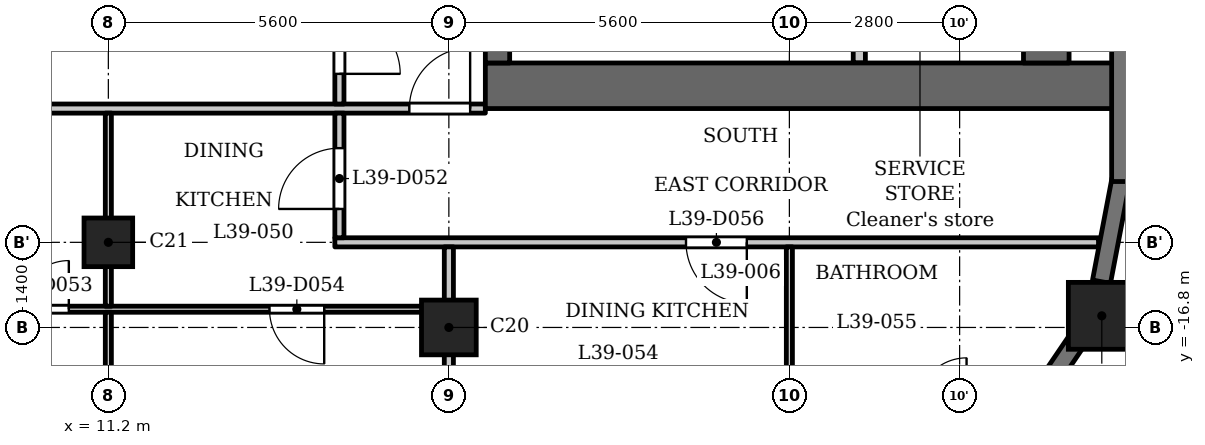
"""IFC4 building model, lengths in metres.
Left out: names, types, materials, properties, quantities, classifications, styles, units other than length and angle.
Written with IfcOpenShell. Run it as: python <this file> out.ifc"""

import sys

from ifc_helpers import new_model, si_unit, direction, frame, frame_2d, origin, origin_2d, place, context, subcontext, project, spatial, rectangle, extrude, element, fill, save


model = new_model("IFC4")
c1 = context("Model", 3, precision=1e-05, world=origin(), true_north=direction((0.0, 1.0)))
c2 = subcontext(c1, "Body", "Model", "MODEL_VIEW")
j1 = project(units=[si_unit("LENGTHUNIT", "METRE"), si_unit("PLANEANGLEUNIT", "RADIAN")], contexts=[c1])
p1 = place(None, origin())
s1 = spatial("IfcSite", under=j1, at=p1, CompositionType="ELEMENT")
p2 = place(p1, origin())
s2 = spatial("IfcBuilding", under=s1, at=p2, CompositionType="ELEMENT")
p3 = place(p2, frame((0.0, 0.0, 153.6)))
s3 = spatial("IfcBuildingStorey", under=s2, at=p3, CompositionType="ELEMENT", Elevation=153.6)
p4 = place(p3, frame((27.538, -16.609, 0.0), z_axis=(0.0, 0.0, 1.0), x_axis=(1.0, 0.0, 0.0)))
e1 = element("IfcColumn", 1, at=p4, inside=s3, PredefinedType="COLUMN", context=c2, shape_type="SweptSolid", body=[
    extrude(rectangle(XDim=1.1, YDim=1.1, at=origin_2d()), origin(), (0.0, 0.0, 1.0), 3.5),
])
p5 = place(p3, frame((16.8, -16.8, 0.0), z_axis=(0.0, 0.0, 1.0), x_axis=(1.0, 0.0, 0.0)))
e2 = element("IfcColumn", 2, at=p5, inside=s3, PredefinedType="COLUMN", context=c2, shape_type="SweptSolid", body=[
    extrude(rectangle(XDim=0.9, YDim=0.9, at=origin_2d()), origin(), (0.0, 0.0, 1.0), 3.5),
])
p6 = place(p3, frame((11.2, -15.4, 0.0), z_axis=(0.0, 0.0, 1.0), x_axis=(1.0, 0.0, 0.0)))
e3 = element("IfcColumn", 3, at=p6, inside=s3, PredefinedType="COLUMN", context=c2, shape_type="SweptSolid", body=[
    extrude(rectangle(XDim=0.8, YDim=0.8, at=origin_2d()), origin(), (0.0, 0.0, 1.0), 3.5),
])
p7 = place(p3, frame((26.532, -17.893, 0.0), z_axis=(0.0, 0.0, 1.0), x_axis=(0.562105419172, 0.82706559458, 0.0)))
e4 = element("IfcWall", 4, at=p7, inside=s3, PredefinedType="SOLIDWALL", context=c2, shape_type="SweptSolid", body=[
    extrude(rectangle(XDim=1.077, YDim=0.3, at=frame_2d((0.539, 0.0))), origin(), (0.0, 0.0, 1.0), 3.2),
])
p8 = place(p3, frame((27.533, -16.048, 0.0), z_axis=(0.0, 0.0, 1.0), x_axis=(0.187302784601, 0.982302227871, 0.0)))
e5 = element("IfcWall", 5, at=p8, inside=s3, PredefinedType="SOLIDWALL", context=c2, shape_type="SweptSolid", body=[
    extrude(rectangle(XDim=1.706, YDim=0.3, at=frame_2d((0.853, 0.0))), origin(), (0.0, 0.0, 1.0), 2.45),
])
p9 = place(p3, frame((27.85, -14.4, 0.0), z_axis=(0.0, 0.0, 1.0), x_axis=(0.0, 1.0, 0.0)))
e6 = element("IfcWall", 6, at=p9, inside=s3, PredefinedType="SOLIDWALL", context=c2, shape_type="SweptSolid", body=[
    extrude(rectangle(XDim=2.65, YDim=0.3, at=frame_2d((1.325, 0.0))), origin(), (0.0, 0.0, 1.0), 2.45),
])
p10 = place(p3, frame((17.4, -12.825, 0.0), z_axis=(0.0, 0.0, 1.0), x_axis=(1.0, 0.0, 0.0)))
e7 = element("IfcWall", 7, at=p10, inside=s3, PredefinedType="SHEAR", context=c2, shape_type="SweptSolid", body=[
    extrude(rectangle(XDim=10.4, YDim=0.75, at=frame_2d((5.2, 0.0))), origin(), (0.0, 0.0, 1.0), 3.2),
])
p11 = place(p3, frame((17.6, -12.45, 0.0), z_axis=(0.0, 0.0, 1.0), x_axis=(0.0, 1.0, 0.0)))
e8 = element("IfcWall", 8, at=p11, inside=s3, PredefinedType="SHEAR", context=c2, shape_type="SweptSolid", body=[
    extrude(rectangle(XDim=24.9, YDim=0.4, at=frame_2d((12.45, 0.0))), origin(), (0.0, 0.0, 1.0), 3.2),
])
p12 = place(p11, frame((6.325, 0.0, 0.0)))
e9 = element("IfcOpeningElement", 9, at=p12, cuts=e8, PredefinedType="OPENING", context=c2, shape_type="SweptSolid", body=[
    extrude(rectangle(XDim=0.9, YDim=2.1, at=frame_2d((0.45, 1.05))), frame((0.0, 0.21, 0.0), z_axis=(0.0, -1.0, 0.0), x_axis=(1.0, 0.0, 0.0)), (0.0, 0.0, 1.0), 0.42),
])
p13 = place(p11, frame((9.925, 0.0, 0.0)))
e10 = element("IfcOpeningElement", 10, at=p13, cuts=e8, PredefinedType="OPENING", context=c2, shape_type="SweptSolid", body=[
    extrude(rectangle(XDim=0.9, YDim=2.1, at=frame_2d((0.45, 1.05))), frame((0.0, 0.21, 0.0), z_axis=(0.0, -1.0, 0.0), x_axis=(1.0, 0.0, 0.0)), (0.0, 0.0, 1.0), 0.42),
])
p14 = place(p11, frame((15.6, 0.0, 0.0)))
e11 = element("IfcOpeningElement", 11, at=p14, cuts=e8, PredefinedType="OPENING", context=c2, shape_type="SweptSolid", body=[
    extrude(rectangle(XDim=1.1, YDim=2.1, at=frame_2d((0.55, 1.05))), frame((0.0, 0.21, 0.0), z_axis=(0.0, -1.0, 0.0), x_axis=(1.0, 0.0, 0.0)), (0.0, 0.0, 1.0), 0.42),
])
p15 = place(p11, frame((18.0, 0.0, 0.0)))
e12 = element("IfcOpeningElement", 12, at=p15, cuts=e8, PredefinedType="OPENING", context=c2, shape_type="SweptSolid", body=[
    extrude(rectangle(XDim=1.1, YDim=2.1, at=frame_2d((0.55, 1.05))), frame((0.0, 0.21, 0.0), z_axis=(0.0, -1.0, 0.0), x_axis=(1.0, 0.0, 0.0)), (0.0, 0.0, 1.0), 0.42),
])
p16 = place(p11, frame((23.025, 0.0, 0.0)))
e13 = element("IfcOpeningElement", 13, at=p16, cuts=e8, PredefinedType="OPENING", context=c2, shape_type="SweptSolid", body=[
    extrude(rectangle(XDim=1.1, YDim=2.1, at=frame_2d((0.55, 1.05))), frame((0.0, 0.21, 0.0), z_axis=(0.0, -1.0, 0.0), x_axis=(1.0, 0.0, 0.0)), (0.0, 0.0, 1.0), 0.42),
])
p17 = place(p11, frame((0.775, 0.0, 0.0)))
e14 = element("IfcOpeningElement", 14, at=p17, cuts=e8, PredefinedType="OPENING", context=c2, shape_type="SweptSolid", body=[
    extrude(rectangle(XDim=1.1, YDim=2.1, at=frame_2d((0.55, 1.05))), frame((0.0, 0.21, 0.0), z_axis=(0.0, -1.0, 0.0), x_axis=(1.0, 0.0, 0.0)), (0.0, 0.0, 1.0), 0.42),
])
p18 = place(p11, frame((12.925, 0.0, 0.0)))
e15 = element("IfcOpeningElement", 15, at=p18, cuts=e8, PredefinedType="OPENING", context=c2, shape_type="SweptSolid", body=[
    extrude(rectangle(XDim=1.8, YDim=2.1, at=frame_2d((0.9, 1.05))), frame((0.0, 0.21, 0.0), z_axis=(0.0, -1.0, 0.0), x_axis=(1.0, 0.0, 0.0)), (0.0, 0.0, 1.0), 0.42),
])
p19 = place(p3, frame((26.625, -12.45, 0.0), z_axis=(0.0, 0.0, 1.0), x_axis=(0.0, 1.0, 0.0)))
e16 = element("IfcWall", 16, at=p19, inside=s3, PredefinedType="SHEAR", context=c2, shape_type="SweptSolid", body=[
    extrude(rectangle(XDim=24.9, YDim=0.75, at=frame_2d((12.45, 0.0))), origin(), (0.0, 0.0, 1.0), 3.2),
])
p20 = place(p3, frame((23.55, -12.45, 0.0), z_axis=(0.0, 0.0, 1.0), x_axis=(0.0, 1.0, 0.0)))
e17 = element("IfcWall", 17, at=p20, inside=s3, PredefinedType="PARTITIONING", context=c2, shape_type="SweptSolid", body=[
    extrude(rectangle(XDim=2.65, YDim=0.2, at=frame_2d((1.325, 0.0))), origin(), (0.0, 0.0, 1.0), 3.2),
])
p21 = place(p20, frame((0.875, 0.0, 0.0)))
e18 = element("IfcOpeningElement", 18, at=p21, cuts=e17, PredefinedType="OPENING", context=c2, shape_type="SweptSolid", body=[
    extrude(rectangle(XDim=0.9, YDim=2.1, at=frame_2d((0.45, 1.05))), frame((0.0, 0.11, 0.0), z_axis=(0.0, -1.0, 0.0), x_axis=(1.0, 0.0, 0.0)), (0.0, 0.0, 1.0), 0.22),
])
p22 = place(p3, frame((-16.725, -16.5, 0.0), z_axis=(0.0, 0.0, 1.0), x_axis=(1.0, 0.0, 0.0)))
e19 = element("IfcWall", 19, at=p22, inside=s3, PredefinedType="PARTITIONING", context=c2, shape_type="SweptSolid", body=[
    extrude(rectangle(XDim=33.45, YDim=0.1, at=frame_2d((16.725, 0.0))), origin(), (0.0, 0.0, 1.0), 3.2),
])
p23 = place(p22, frame((9.675, 0.0, 0.0)))
e20 = element("IfcOpeningElement", 20, at=p23, cuts=e19, PredefinedType="OPENING", context=c2, shape_type="SweptSolid", body=[
    extrude(rectangle(XDim=0.8, YDim=2.1, at=frame_2d((0.4, 1.05))), frame((0.0, 0.06, 0.0), z_axis=(0.0, -1.0, 0.0), x_axis=(1.0, 0.0, 0.0)), (0.0, 0.0, 1.0), 0.12),
])
p24 = place(p22, frame((4.075, 0.0, 0.0)))
e21 = element("IfcOpeningElement", 21, at=p24, cuts=e19, PredefinedType="OPENING", context=c2, shape_type="SweptSolid", body=[
    extrude(rectangle(XDim=0.9, YDim=2.1, at=frame_2d((0.45, 1.05))), frame((0.0, 0.06, 0.0), z_axis=(0.0, -1.0, 0.0), x_axis=(1.0, 0.0, 0.0)), (0.0, 0.0, 1.0), 0.12),
])
p25 = place(p22, frame((20.875, 0.0, 0.0)))
e22 = element("IfcOpeningElement", 22, at=p25, cuts=e19, PredefinedType="OPENING", context=c2, shape_type="SweptSolid", body=[
    extrude(rectangle(XDim=0.8, YDim=2.1, at=frame_2d((0.4, 1.05))), frame((0.0, 0.06, 0.0), z_axis=(0.0, -1.0, 0.0), x_axis=(1.0, 0.0, 0.0)), (0.0, 0.0, 1.0), 0.12),
])
p26 = place(p22, frame((15.275, 0.0, 0.0)))
e23 = element("IfcOpeningElement", 23, at=p26, cuts=e19, PredefinedType="OPENING", context=c2, shape_type="SweptSolid", body=[
    extrude(rectangle(XDim=0.9, YDim=2.1, at=frame_2d((0.45, 1.05))), frame((0.0, 0.06, 0.0), z_axis=(0.0, -1.0, 0.0), x_axis=(1.0, 0.0, 0.0)), (0.0, 0.0, 1.0), 0.12),
])
p27 = place(p22, frame((26.475, 0.0, 0.0)))
e24 = element("IfcOpeningElement", 24, at=p27, cuts=e19, PredefinedType="OPENING", context=c2, shape_type="SweptSolid", body=[
    extrude(rectangle(XDim=0.8, YDim=2.1, at=frame_2d((0.4, 1.05))), frame((0.0, 0.06, 0.0), z_axis=(0.0, -1.0, 0.0), x_axis=(1.0, 0.0, 0.0)), (0.0, 0.0, 1.0), 0.12),
])
p28 = place(p22, frame((30.575, 0.0, 0.0)))
e25 = element("IfcOpeningElement", 25, at=p28, cuts=e19, PredefinedType="OPENING", context=c2, shape_type="SweptSolid", body=[
    extrude(rectangle(XDim=0.9, YDim=2.1, at=frame_2d((0.45, 1.05))), frame((0.0, 0.06, 0.0), z_axis=(0.0, -1.0, 0.0), x_axis=(1.0, 0.0, 0.0)), (0.0, 0.0, 1.0), 0.12),
])
p29 = place(p3, frame((14.925, -15.4, 0.0), z_axis=(0.0, 0.0, 1.0), x_axis=(1.0, 0.0, 0.0)))
e26 = element("IfcWall", 26, at=p29, inside=s3, PredefinedType="PARTITIONING", context=c2, shape_type="SweptSolid", body=[
    extrude(rectangle(XDim=12.559, YDim=0.15, at=frame_2d((6.279, 0.0))), origin(), (0.0, 0.0, 1.0), 3.2),
])
p30 = place(p29, frame((5.775, 0.0, 0.0)))
e27 = element("IfcOpeningElement", 27, at=p30, cuts=e26, PredefinedType="OPENING", context=c2, shape_type="SweptSolid", body=[
    extrude(rectangle(XDim=1.0, YDim=2.1, at=frame_2d((0.5, 1.05))), frame((0.0, 0.085, 0.0), z_axis=(0.0, -1.0, 0.0), x_axis=(1.0, 0.0, 0.0)), (0.0, 0.0, 1.0), 0.17),
])
p31 = place(p3, frame((-17.4, -13.2, 0.0), z_axis=(0.0, 0.0, 1.0), x_axis=(1.0, 0.0, 0.0)))
e28 = element("IfcWall", 28, at=p31, inside=s3, PredefinedType="PARTITIONING", context=c2, shape_type="SweptSolid", body=[
    extrude(rectangle(XDim=34.8, YDim=0.15, at=frame_2d((17.4, 0.0))), origin(), (0.0, 0.0, 1.0), 3.2),
])
p32 = place(p31, frame((0.15, 0.0, 0.0)))
e29 = element("IfcOpeningElement", 29, at=p32, cuts=e28, PredefinedType="OPENING", context=c2, shape_type="SweptSolid", body=[
    extrude(rectangle(XDim=1.0, YDim=2.1, at=frame_2d((0.5, 1.05))), frame((0.0, 0.085, 0.0), z_axis=(0.0, -1.0, 0.0), x_axis=(1.0, 0.0, 0.0)), (0.0, 0.0, 1.0), 0.17),
])
p33 = place(p31, frame((33.55, 0.0, 0.0)))
e30 = element("IfcOpeningElement", 30, at=p33, cuts=e28, PredefinedType="OPENING", context=c2, shape_type="SweptSolid", body=[
    extrude(rectangle(XDim=1.0, YDim=2.1, at=frame_2d((0.5, 1.05))), frame((0.0, 0.085, 0.0), z_axis=(0.0, -1.0, 0.0), x_axis=(1.0, 0.0, 0.0)), (0.0, 0.0, 1.0), 0.17),
])
p34 = place(p31, frame((15.7, 0.0, 0.0)))
e31 = element("IfcOpeningElement", 31, at=p34, cuts=e28, PredefinedType="OPENING", context=c2, shape_type="SweptSolid", body=[
    extrude(rectangle(XDim=1.0, YDim=2.1, at=frame_2d((0.5, 1.05))), frame((0.0, 0.085, 0.0), z_axis=(0.0, -1.0, 0.0), x_axis=(1.0, 0.0, 0.0)), (0.0, 0.0, 1.0), 0.17),
])
p35 = place(p3, frame((11.2, -22.93, 0.0), z_axis=(0.0, 0.0, 1.0), x_axis=(0.0, 1.0, 0.0)))
e32 = element("IfcWall", 32, at=p35, inside=s3, PredefinedType="PARTITIONING", context=c2, shape_type="SweptSolid", body=[
    extrude(rectangle(XDim=6.38, YDim=0.1, at=frame_2d((3.19, 0.0))), origin(), (0.0, 0.0, 1.0), 3.2),
])
p36 = place(p35, frame((4.13, 0.0, 0.0)))
e33 = element("IfcOpeningElement", 33, at=p36, cuts=e32, PredefinedType="OPENING", context=c2, shape_type="SweptSolid", body=[
    extrude(rectangle(XDim=0.9, YDim=2.1, at=frame_2d((0.45, 1.05))), frame((0.0, 0.06, 0.0), z_axis=(0.0, -1.0, 0.0), x_axis=(1.0, 0.0, 0.0)), (0.0, 0.0, 1.0), 0.12),
])
p37 = place(p3, frame((11.2, -16.45, 0.0), z_axis=(0.0, 0.0, 1.0), x_axis=(0.0, 1.0, 0.0)))
e34 = element("IfcWall", 34, at=p37, inside=s3, PredefinedType="PARTITIONING", context=c2, shape_type="SweptSolid", body=[
    extrude(rectangle(XDim=3.175, YDim=0.1, at=frame_2d((1.587, 0.0))), origin(), (0.0, 0.0, 1.0), 3.2),
])
p38 = place(p3, frame((15.0, -15.325, 0.0), z_axis=(0.0, 0.0, 1.0), x_axis=(0.0, 1.0, 0.0)))
e35 = element("IfcWall", 35, at=p38, inside=s3, PredefinedType="PARTITIONING", context=c2, shape_type="SweptSolid", body=[
    extrude(rectangle(XDim=2.05, YDim=0.15, at=frame_2d((1.025, 0.0))), origin(), (0.0, 0.0, 1.0), 3.2),
])
p39 = place(p38, frame((0.474, 0.0, 0.0)))
e36 = element("IfcOpeningElement", 36, at=p39, cuts=e35, PredefinedType="OPENING", context=c2, shape_type="SweptSolid", body=[
    extrude(rectangle(XDim=1.0, YDim=2.1, at=frame_2d((0.5, 1.05))), frame((0.0, 0.085, 0.0), z_axis=(0.0, -1.0, 0.0), x_axis=(1.0, 0.0, 0.0)), (0.0, 0.0, 1.0), 0.17),
])
p40 = place(p3, frame((15.0, -13.125, 0.0), z_axis=(0.0, 0.0, 1.0), x_axis=(0.0, 1.0, 0.0)))
e37 = element("IfcWall", 37, at=p40, inside=s3, PredefinedType="PARTITIONING", context=c2, shape_type="SweptSolid", body=[
    extrude(rectangle(XDim=6.356, YDim=0.15, at=frame_2d((3.178, 0.0))), origin(), (0.0, 0.0, 1.0), 3.2),
])
p41 = place(p40, frame((0.496, 0.0, 0.0)))
e38 = element("IfcOpeningElement", 38, at=p41, cuts=e37, PredefinedType="OPENING", context=c2, shape_type="SweptSolid", body=[
    extrude(rectangle(XDim=1.0, YDim=2.1, at=frame_2d((0.5, 1.05))), frame((0.0, 0.085, 0.0), z_axis=(0.0, -1.0, 0.0), x_axis=(1.0, 0.0, 0.0)), (0.0, 0.0, 1.0), 0.17),
])
p42 = place(p3, frame((16.8, -22.93, 0.0), z_axis=(0.0, 0.0, 1.0), x_axis=(0.0, 1.0, 0.0)))
e39 = element("IfcWall", 39, at=p42, inside=s3, PredefinedType="PARTITIONING", context=c2, shape_type="SweptSolid", body=[
    extrude(rectangle(XDim=7.455, YDim=0.15, at=frame_2d((3.728, 0.0))), origin(), (0.0, 0.0, 1.0), 3.2),
])
p43 = place(p3, frame((22.4, -18.05, 0.0), z_axis=(0.0, 0.0, 1.0), x_axis=(0.0, 1.0, 0.0)))
e40 = element("IfcWall", 40, at=p43, inside=s3, PredefinedType="PARTITIONING", context=c2, shape_type="SweptSolid", body=[
    extrude(rectangle(XDim=2.575, YDim=0.1, at=frame_2d((1.288, 0.0))), origin(), (0.0, 0.0, 1.0), 3.2),
])
p44 = place(p41, origin())
e41 = element("IfcDoor", 41, at=p44, inside=s3, OperationType="SINGLE_SWING_LEFT", PredefinedType="DOOR", context=c2, shape_type="SweptSolid", body=[
    extrude(rectangle(XDim=1.0, YDim=2.1, at=frame_2d((0.5, 1.05))), frame((0.0, 0.025, 0.0), z_axis=(0.0, -1.0, 0.0), x_axis=(1.0, 0.0, 0.0)), (0.0, 0.0, 1.0), 0.05),
])
fill(e38, e41)
p45 = place(p33, origin())
e42 = element("IfcDoor", 42, at=p45, inside=s3, OperationType="SINGLE_SWING_LEFT", PredefinedType="DOOR", context=c2, shape_type="SweptSolid", body=[
    extrude(rectangle(XDim=1.0, YDim=2.1, at=frame_2d((0.5, 1.05))), frame((0.0, 0.025, 0.0), z_axis=(0.0, -1.0, 0.0), x_axis=(1.0, 0.0, 0.0)), (0.0, 0.0, 1.0), 0.05),
])
fill(e30, e42)
p46 = place(p39, origin())
e43 = element("IfcDoor", 43, at=p46, inside=s3, OperationType="SINGLE_SWING_RIGHT", PredefinedType="DOOR", context=c2, shape_type="SweptSolid", body=[
    extrude(rectangle(XDim=1.0, YDim=2.1, at=frame_2d((0.5, 1.05))), frame((0.0, 0.025, 0.0), z_axis=(0.0, -1.0, 0.0), x_axis=(1.0, 0.0, 0.0)), (0.0, 0.0, 1.0), 0.05),
])
fill(e36, e43)
p47 = place(p27, origin())
e44 = element("IfcDoor", 44, at=p47, inside=s3, OperationType="SINGLE_SWING_LEFT", PredefinedType="DOOR", context=c2, shape_type="SweptSolid", body=[
    extrude(rectangle(XDim=0.8, YDim=2.1, at=frame_2d((0.4, 1.05))), frame((0.0, 0.025, 0.0), z_axis=(0.0, -1.0, 0.0), x_axis=(1.0, 0.0, 0.0)), (0.0, 0.0, 1.0), 0.05),
])
fill(e24, e44)
p48 = place(p28, origin())
e45 = element("IfcDoor", 45, at=p48, inside=s3, OperationType="SINGLE_SWING_RIGHT", PredefinedType="DOOR", context=c2, shape_type="SweptSolid", body=[
    extrude(rectangle(XDim=0.9, YDim=2.1, at=frame_2d((0.45, 1.05))), frame((0.0, 0.025, 0.0), z_axis=(0.0, -1.0, 0.0), x_axis=(1.0, 0.0, 0.0)), (0.0, 0.0, 1.0), 0.05),
])
fill(e25, e45)
p49 = place(p30, origin())
e46 = element("IfcDoor", 46, at=p49, inside=s3, OperationType="SINGLE_SWING_RIGHT", PredefinedType="DOOR", context=c2, shape_type="SweptSolid", body=[
    extrude(rectangle(XDim=1.0, YDim=2.1, at=frame_2d((0.5, 1.05))), frame((0.0, 0.025, 0.0), z_axis=(0.0, -1.0, 0.0), x_axis=(1.0, 0.0, 0.0)), (0.0, 0.0, 1.0), 0.05),
])
fill(e27, e46)
save(model, sys.argv[1])
